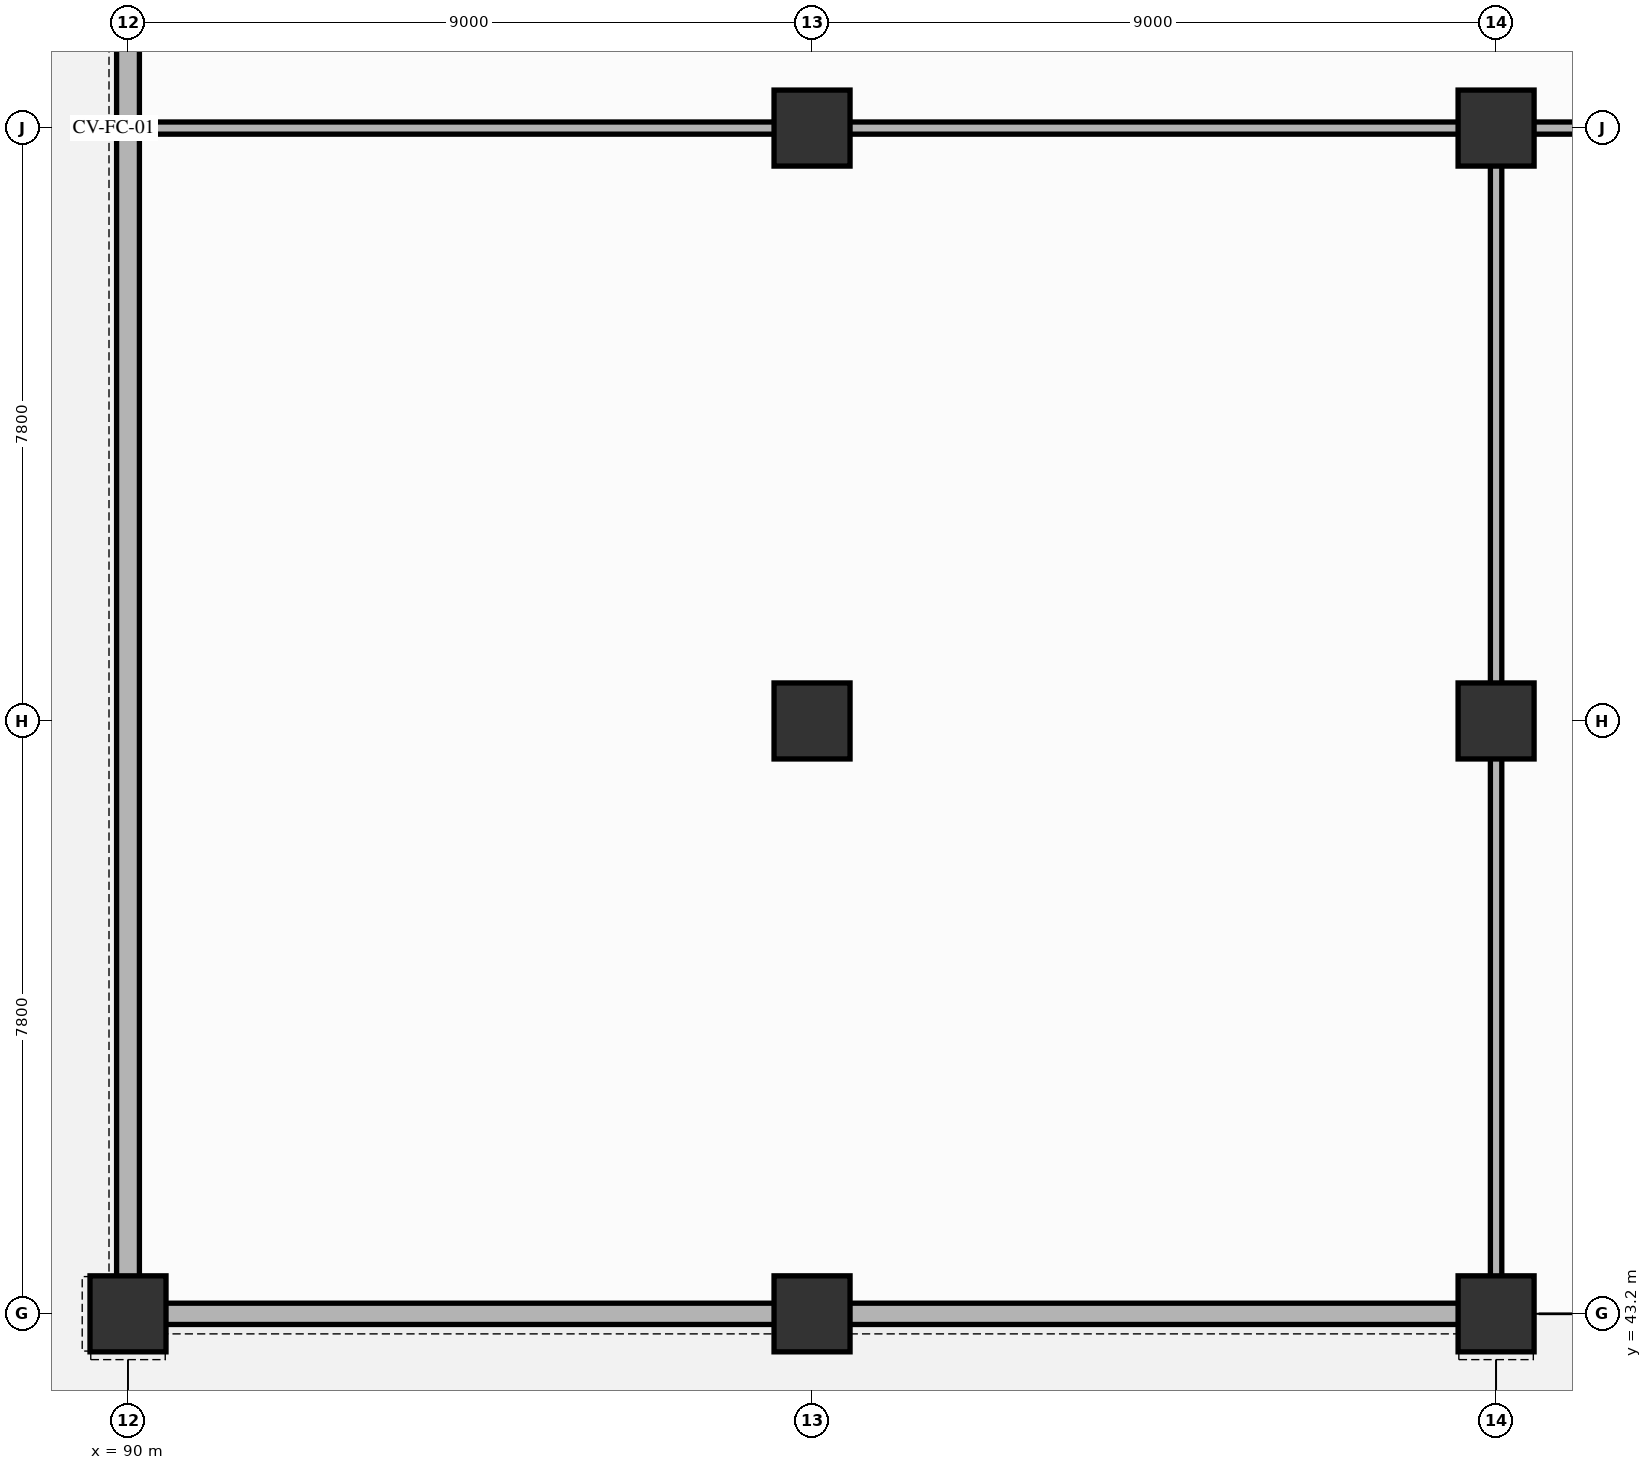
"""IFC4 building model, lengths in metres.
Left out: names, types, materials, properties, quantities, classifications, styles, units other than length and angle.
Written with IfcOpenShell. Run it as: python <this file> out.ifc"""

import sys

from ifc_helpers import new_model, si_unit, direction, frame, frame_2d, origin, origin_2d, place, context, subcontext, project, spatial, rectangle, extrude, element, fill, save


model = new_model("IFC4")
c1 = context("Model", 3, precision=1e-05, world=origin(), true_north=direction((0.0, 1.0)))
c2 = subcontext(c1, "Body", "Model", "MODEL_VIEW")
j1 = project(units=[si_unit("LENGTHUNIT", "METRE"), si_unit("PLANEANGLEUNIT", "RADIAN")], contexts=[c1])
p1 = place(None, origin())
s1 = spatial("IfcSite", under=j1, at=p1, CompositionType="ELEMENT")
p2 = place(p1, origin())
s2 = spatial("IfcBuilding", under=s1, at=p2, CompositionType="ELEMENT")
p3 = place(p2, origin())
s3 = spatial("IfcBuildingStorey", under=s2, at=p3, CompositionType="ELEMENT", Elevation=0.0)
for number, where, z_axis, x_axis in (
    (1, (90.0, 43.2, 0.0), (0.0, 0.0, 1.0), (1.0, 0.0, 0.0)),
    (2, (99.0, 43.2, 0.0), (0.0, 0.0, 1.0), (1.0, 0.0, 0.0)),
    (3, (99.0, 51.0, 0.0), (0.0, 0.0, 1.0), (1.0, 0.0, 0.0)),
    (4, (99.0, 58.8, 0.0), (0.0, 0.0, 1.0), (1.0, 0.0, 0.0)),
    (5, (108.0, 43.2, 0.0), (0.0, 0.0, 1.0), (1.0, 0.0, 0.0)),
    (6, (108.0, 51.0, 0.0), (0.0, 0.0, 1.0), (1.0, 0.0, 0.0)),
    (7, (108.0, 58.8, 0.0), (0.0, 0.0, 1.0), (1.0, 0.0, 0.0)),
):
    element("IfcColumn", number, at=place(p3, frame(where, z_axis=z_axis, x_axis=x_axis)), inside=s3, PredefinedType="COLUMN", context=c2, shape_type="SweptSolid", body=[
        extrude(rectangle(XDim=1.0, YDim=1.0, at=origin_2d()), origin(), (0.0, 0.0, 1.0), 5.1),
    ])
p4 = place(p3, frame((90.0, 43.2, 0.0), z_axis=(0.0, 0.0, 1.0), x_axis=(0.0, 1.0, 0.0)))
e8 = element("IfcWall", 8, at=p4, inside=s3, PredefinedType="SOLIDWALL", context=c2, shape_type="SweptSolid", body=[
    extrude(rectangle(XDim=31.2, YDim=0.3, at=frame_2d((15.6, 0.0))), origin(), (0.0, 0.0, 1.0), 5.25),
])
p5 = place(p4, frame((3.5, 0.0, 0.9)))
e9 = element("IfcOpeningElement", 9, at=p5, cuts=e8, PredefinedType="OPENING", context=c2, shape_type="SweptSolid", body=[
    extrude(rectangle(XDim=1.6, YDim=2.05, at=frame_2d((0.8, 1.025))), frame((0.0, 0.16, 0.0), z_axis=(0.0, -1.0, 0.0), x_axis=(1.0, 0.0, 0.0)), (0.0, 0.0, 1.0), 0.32),
])
p6 = place(p4, frame((11.5, 0.0, 0.9)))
e10 = element("IfcOpeningElement", 10, at=p6, cuts=e8, PredefinedType="OPENING", context=c2, shape_type="SweptSolid", body=[
    extrude(rectangle(XDim=1.8, YDim=2.1, at=frame_2d((0.9, 1.05))), frame((0.0, 0.16, 0.0), z_axis=(0.0, -1.0, 0.0), x_axis=(1.0, 0.0, 0.0)), (0.0, 0.0, 1.0), 0.32),
])
p7 = place(p4, frame((19.5, 0.0, 0.9)))
e11 = element("IfcOpeningElement", 11, at=p7, cuts=e8, PredefinedType="OPENING", context=c2, shape_type="SweptSolid", body=[
    extrude(rectangle(XDim=1.6, YDim=2.05, at=frame_2d((0.8, 1.025))), frame((0.0, 0.16, 0.0), z_axis=(0.0, -1.0, 0.0), x_axis=(1.0, 0.0, 0.0)), (0.0, 0.0, 1.0), 0.32),
])
p8 = place(p4, frame((26.2, 0.0, 0.9)))
e12 = element("IfcOpeningElement", 12, at=p8, cuts=e8, PredefinedType="OPENING", context=c2, shape_type="SweptSolid", body=[
    extrude(rectangle(XDim=1.2, YDim=2.1, at=frame_2d((0.6, 1.05))), frame((0.0, 0.16, 0.0), z_axis=(0.0, -1.0, 0.0), x_axis=(1.0, 0.0, 0.0)), (0.0, 0.0, 1.0), 0.32),
])
p9 = place(p3, frame((90.0, 43.2, 0.0), z_axis=(0.0, 0.0, 1.0), x_axis=(1.0, 0.0, 0.0)))
e13 = element("IfcWall", 13, at=p9, inside=s3, PredefinedType="SOLIDWALL", context=c2, shape_type="SweptSolid", body=[
    extrude(rectangle(XDim=18.0, YDim=0.28, at=frame_2d((9.0, 0.0))), origin(), (0.0, 0.0, 1.0), 3.425),
])
p10 = place(p9, frame((3.6, 0.0, 0.0)))
e14 = element("IfcOpeningElement", 14, at=p10, cuts=e13, PredefinedType="OPENING", context=c2, shape_type="SweptSolid", body=[
    extrude(rectangle(XDim=1.8, YDim=2.6, at=frame_2d((0.9, 1.3))), frame((0.0, 0.15, 0.0), z_axis=(0.0, -1.0, 0.0), x_axis=(1.0, 0.0, 0.0)), (0.0, 0.0, 1.0), 0.3),
])
p11 = place(p9, frame((10.8, 0.0, 0.9)))
e15 = element("IfcOpeningElement", 15, at=p11, cuts=e13, PredefinedType="OPENING", context=c2, shape_type="SweptSolid", body=[
    extrude(rectangle(XDim=1.8, YDim=2.1, at=frame_2d((0.9, 1.05))), frame((0.0, 0.15, 0.0), z_axis=(0.0, -1.0, 0.0), x_axis=(1.0, 0.0, 0.0)), (0.0, 0.0, 1.0), 0.3),
])
p12 = place(p9, frame((14.4, 0.0, 0.9)))
e16 = element("IfcOpeningElement", 16, at=p12, cuts=e13, PredefinedType="OPENING", context=c2, shape_type="SweptSolid", body=[
    extrude(rectangle(XDim=1.5, YDim=2.1, at=frame_2d((0.75, 1.05))), frame((0.0, 0.15, 0.0), z_axis=(0.0, -1.0, 0.0), x_axis=(1.0, 0.0, 0.0)), (0.0, 0.0, 1.0), 0.3),
])
p13 = place(p3, frame((90.0, 58.8, 0.0), z_axis=(0.0, 0.0, 1.0), x_axis=(1.0, 0.0, 0.0)))
e17 = element("IfcWall", 17, at=p13, inside=s3, PredefinedType="PARTITIONING", context=c2, shape_type="SweptSolid", body=[
    extrude(rectangle(XDim=18.0, YDim=0.16, at=frame_2d((9.0, 0.0))), origin(), (0.0, 0.0, 1.0), 4.153),
])
p14 = place(p13, frame((3.6, 0.0, 0.0)))
e18 = element("IfcOpeningElement", 18, at=p14, cuts=e17, PredefinedType="OPENING", context=c2, shape_type="SweptSolid", body=[
    extrude(rectangle(XDim=1.6, YDim=2.2, at=frame_2d((0.8, 1.1))), frame((0.0, 0.09, 0.0), z_axis=(0.0, -1.0, 0.0), x_axis=(1.0, 0.0, 0.0)), (0.0, 0.0, 1.0), 0.18),
])
p15 = place(p3, frame((108.0, 58.8, 0.0), z_axis=(0.0, 0.0, 1.0), x_axis=(1.0, 0.0, 0.0)))
e19 = element("IfcWall", 19, at=p15, inside=s3, PredefinedType="PARTITIONING", context=c2, shape_type="SweptSolid", body=[
    extrude(rectangle(XDim=27.0, YDim=0.16, at=frame_2d((13.5, 0.0))), origin(), (0.0, 0.0, 1.0), 4.163),
])
p16 = place(p15, frame((3.6, 0.0, 0.0)))
e20 = element("IfcOpeningElement", 20, at=p16, cuts=e19, PredefinedType="OPENING", context=c2, shape_type="SweptSolid", body=[
    extrude(rectangle(XDim=1.6, YDim=2.2, at=frame_2d((0.8, 1.1))), frame((0.0, 0.09, 0.0), z_axis=(0.0, -1.0, 0.0), x_axis=(1.0, 0.0, 0.0)), (0.0, 0.0, 1.0), 0.18),
])
p17 = place(p3, frame((108.0, 43.2, 0.0), z_axis=(0.0, 0.0, 1.0), x_axis=(0.0, 1.0, 0.0)))
e21 = element("IfcWall", 21, at=p17, inside=s3, PredefinedType="PARTITIONING", context=c2, shape_type="SweptSolid", body=[
    extrude(rectangle(XDim=15.6, YDim=0.15, at=frame_2d((7.8, 0.0))), origin(), (0.0, 0.0, 1.0), 4.308),
])
p18 = place(p5, origin())
e22 = element("IfcWindow", 22, at=p18, inside=s3, PartitioningType="SINGLE_PANEL", PredefinedType="WINDOW", context=c2, shape_type="SweptSolid", body=[
    extrude(rectangle(XDim=1.6, YDim=2.05, at=frame_2d((0.8, 1.025))), frame((0.0, 0.03, 0.0), z_axis=(0.0, -1.0, 0.0), x_axis=(1.0, 0.0, 0.0)), (0.0, 0.0, 1.0), 0.06),
])
fill(e9, e22)
p19 = place(p6, origin())
e23 = element("IfcWindow", 23, at=p19, inside=s3, PartitioningType="SINGLE_PANEL", PredefinedType="WINDOW", context=c2, shape_type="SweptSolid", body=[
    extrude(rectangle(XDim=1.8, YDim=2.1, at=frame_2d((0.9, 1.05))), frame((0.0, 0.03, 0.0), z_axis=(0.0, -1.0, 0.0), x_axis=(1.0, 0.0, 0.0)), (0.0, 0.0, 1.0), 0.06),
])
fill(e10, e23)
p20 = place(p10, frame((1.8, 0.0, 0.0), z_axis=(0.0, 0.0, 1.0), x_axis=(-1.0, 0.0, 0.0)))
e24 = element("IfcDoor", 24, at=p20, inside=s3, OperationType="DOUBLE_DOOR_SINGLE_SWING", PredefinedType="DOOR", context=c2, shape_type="SweptSolid", body=[
    extrude(rectangle(XDim=1.8, YDim=2.6, at=frame_2d((0.9, 1.3))), frame((0.0, 0.025, 0.0), z_axis=(0.0, -1.0, 0.0), x_axis=(1.0, 0.0, 0.0)), (0.0, 0.0, 1.0), 0.05),
])
fill(e14, e24)
p21 = place(p11, origin())
e25 = element("IfcWindow", 25, at=p21, inside=s3, PartitioningType="SINGLE_PANEL", PredefinedType="WINDOW", context=c2, shape_type="SweptSolid", body=[
    extrude(rectangle(XDim=1.8, YDim=2.1, at=frame_2d((0.9, 1.05))), frame((0.0, 0.03, 0.0), z_axis=(0.0, -1.0, 0.0), x_axis=(1.0, 0.0, 0.0)), (0.0, 0.0, 1.0), 0.06),
])
fill(e15, e25)
p22 = place(p12, origin())
e26 = element("IfcWindow", 26, at=p22, inside=s3, PartitioningType="SINGLE_PANEL", PredefinedType="WINDOW", context=c2, shape_type="SweptSolid", body=[
    extrude(rectangle(XDim=1.5, YDim=2.1, at=frame_2d((0.75, 1.05))), frame((0.0, 0.03, 0.0), z_axis=(0.0, -1.0, 0.0), x_axis=(1.0, 0.0, 0.0)), (0.0, 0.0, 1.0), 0.06),
])
fill(e16, e26)
p23 = place(p14, origin())
e27 = element("IfcDoor", 27, at=p23, inside=s3, OperationType="DOUBLE_DOOR_SINGLE_SWING", PredefinedType="DOOR", context=c2, shape_type="SweptSolid", body=[
    extrude(rectangle(XDim=1.6, YDim=2.2, at=frame_2d((0.8, 1.1))), frame((0.0, 0.025, 0.0), z_axis=(0.0, -1.0, 0.0), x_axis=(1.0, 0.0, 0.0)), (0.0, 0.0, 1.0), 0.05),
])
fill(e18, e27)
save(model, sys.argv[1])
